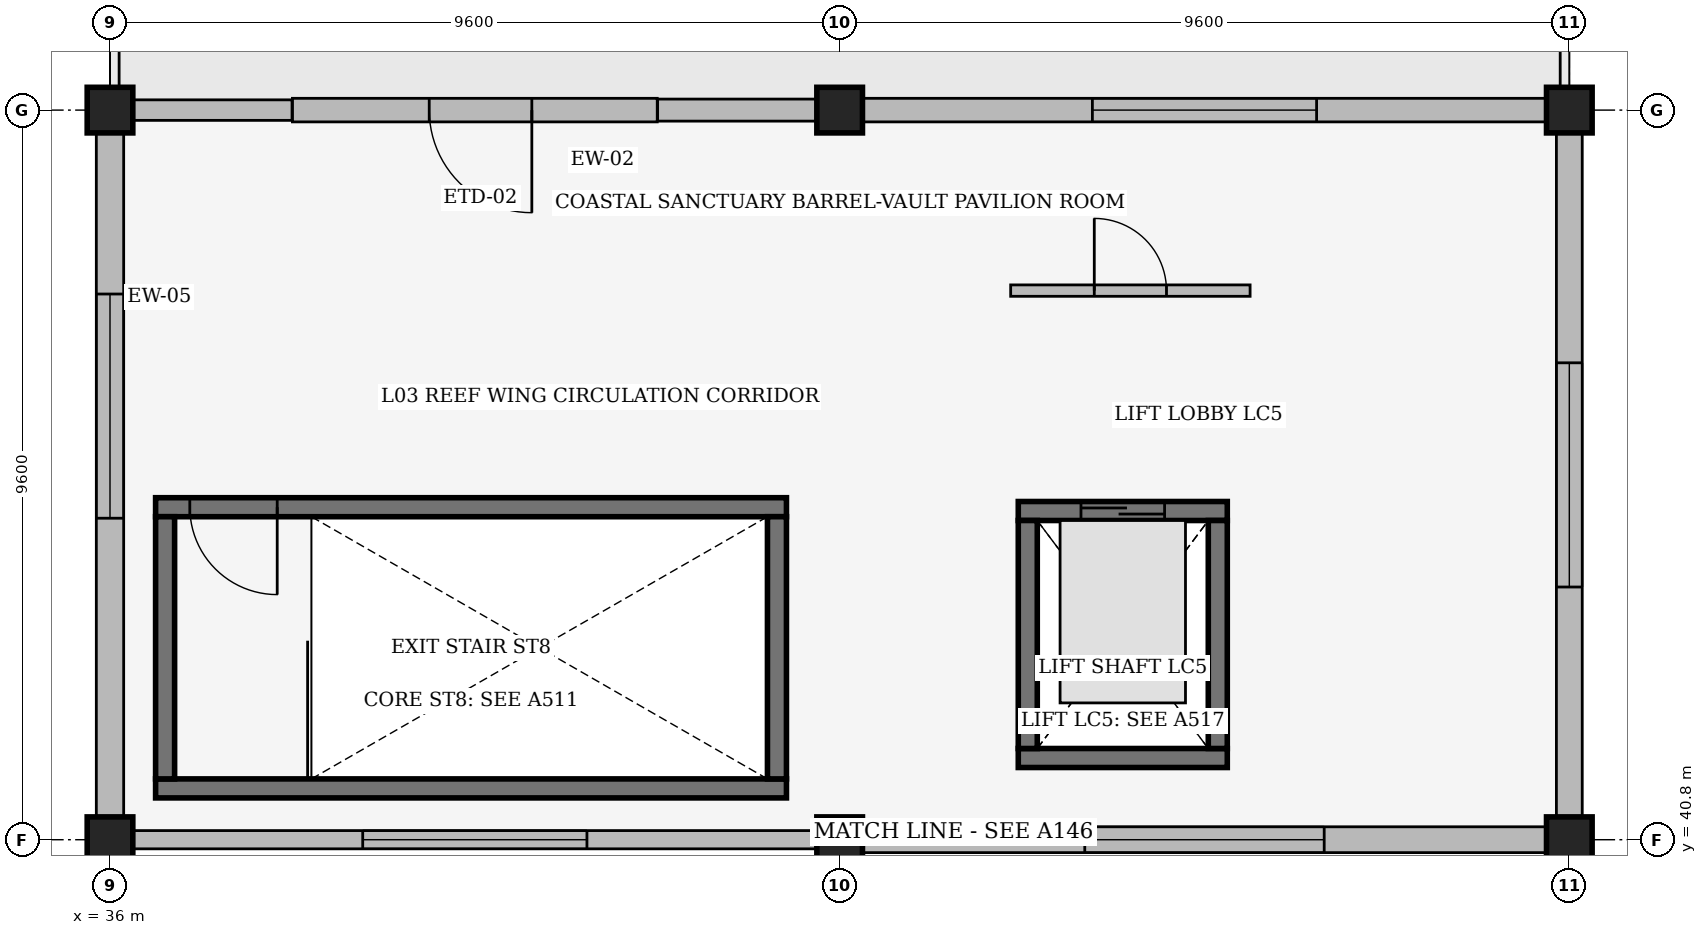
"""IFC4 building model, lengths in metres.
Left out: names, types, materials, properties, quantities, classifications, styles, units other than length and angle.
Written with IfcOpenShell. Run it as: python <this file> out.ifc"""

import sys

from ifc_helpers import new_model, si_unit, direction, frame, frame_2d, origin, origin_2d, place, context, subcontext, project, spatial, rectangle, extrude, element, fill, save


model = new_model("IFC4")
c1 = context("Model", 3, precision=1e-05, world=origin(), true_north=direction((0.0, 1.0)))
c2 = subcontext(c1, "Body", "Model", "MODEL_VIEW")
j1 = project(units=[si_unit("LENGTHUNIT", "METRE"), si_unit("PLANEANGLEUNIT", "RADIAN")], contexts=[c1])
p1 = place(None, origin())
s1 = spatial("IfcSite", under=j1, at=p1, CompositionType="ELEMENT")
p2 = place(p1, origin())
s2 = spatial("IfcBuilding", under=s1, at=p2, CompositionType="ELEMENT")
p3 = place(p2, frame((0.0, 0.0, 15.3)))
s3 = spatial("IfcBuildingStorey", under=s2, at=p3, CompositionType="ELEMENT", Elevation=15.3)
for number, where, z_axis, x_axis in (
    (1, (36.0, 40.8, 0.0), (0.0, 0.0, 1.0), (1.0, 0.0, 0.0)),
    (2, (36.0, 50.4, 0.0), (0.0, 0.0, 1.0), (1.0, 0.0, 0.0)),
    (3, (45.6, 40.8, 0.0), (0.0, 0.0, 1.0), (1.0, 0.0, 0.0)),
    (4, (45.6, 50.4, 0.0), (0.0, 0.0, 1.0), (1.0, 0.0, 0.0)),
    (5, (55.2, 40.8, 0.0), (0.0, 0.0, 1.0), (1.0, 0.0, 0.0)),
    (6, (55.2, 50.4, 0.0), (0.0, 0.0, 1.0), (1.0, 0.0, 0.0)),
):
    element("IfcColumn", number, at=place(p3, frame(where, z_axis=z_axis, x_axis=x_axis)), inside=s3, PredefinedType="COLUMN", context=c2, shape_type="SweptSolid", body=[
        extrude(rectangle(XDim=0.6, YDim=0.6, at=origin_2d()), origin(), (0.0, 0.0, 1.0), 4.5),
    ])
p4 = place(p3, frame((43.2, 50.4, 0.0), z_axis=(0.0, 0.0, 1.0), x_axis=(-1.0, 0.0, 0.0)))
e7 = element("IfcWall", 7, at=p4, inside=s3, PredefinedType="SOLIDWALL", context=c2, shape_type="SweptSolid", body=[
    extrude(rectangle(XDim=4.8, YDim=0.31, at=frame_2d((2.4, 0.0))), origin(), (0.0, 0.0, 1.0), 4.16),
])
p5 = place(p4, frame((3.0, 0.0, 0.0), z_axis=(0.0, 0.0, 1.0), x_axis=(-1.0, 0.0, 0.0)))
e8 = element("IfcOpeningElement", 8, at=p5, cuts=e7, PredefinedType="OPENING", context=c2, shape_type="SweptSolid", body=[
    extrude(rectangle(XDim=1.35, YDim=2.2, at=frame_2d((0.675, 1.1))), frame((0.0, 0.165, 0.0), z_axis=(0.0, -1.0, 0.0), x_axis=(1.0, 0.0, 0.0)), (0.0, 0.0, 1.0), 0.33),
])
p6 = place(p3, frame((55.2, 41.108, 0.0), z_axis=(0.0, 0.0, 1.0), x_axis=(0.0, 1.0, 0.0)))
e9 = element("IfcWall", 9, at=p6, inside=s3, PredefinedType="SOLIDWALL", context=c2, shape_type="SweptSolid", body=[
    extrude(rectangle(XDim=8.984, YDim=0.34, at=frame_2d((4.492, 0.0))), origin(), (0.0, 0.0, 1.0), 4.108),
])
p7 = place(p6, frame((3.017, 0.0, 0.95)))
e10 = element("IfcOpeningElement", 10, at=p7, cuts=e9, PredefinedType="OPENING", context=c2, shape_type="SweptSolid", body=[
    extrude(rectangle(XDim=2.95, YDim=1.2, at=frame_2d((1.475, 0.6))), frame((0.0, 0.18, 0.0), z_axis=(0.0, -1.0, 0.0), x_axis=(1.0, 0.0, 0.0)), (0.0, 0.0, 1.0), 0.36),
])
p8 = place(p3, frame((54.892, 50.4, 0.0), z_axis=(0.0, 0.0, 1.0), x_axis=(-1.0, 0.0, 0.0)))
e11 = element("IfcWall", 11, at=p8, inside=s3, PredefinedType="SOLIDWALL", context=c2, shape_type="SweptSolid", body=[
    extrude(rectangle(XDim=8.984, YDim=0.31, at=frame_2d((4.492, 0.0))), origin(), (0.0, 0.0, 1.0), 4.108),
])
p9 = place(p8, frame((3.017, 0.0, 0.95)))
e12 = element("IfcOpeningElement", 12, at=p9, cuts=e11, PredefinedType="OPENING", context=c2, shape_type="SweptSolid", body=[
    extrude(rectangle(XDim=2.95, YDim=1.5, at=frame_2d((1.475, 0.75))), frame((0.0, 0.165, 0.0), z_axis=(0.0, -1.0, 0.0), x_axis=(1.0, 0.0, 0.0)), (0.0, 0.0, 1.0), 0.33),
])
p10 = place(p3, frame((45.292, 50.4, 0.0), z_axis=(0.0, 0.0, 1.0), x_axis=(-1.0, 0.0, 0.0)))
e13 = element("IfcWall", 13, at=p10, inside=s3, PredefinedType="SOLIDWALL", context=c2, shape_type="SweptSolid", body=[
    extrude(rectangle(XDim=2.087, YDim=0.29, at=frame_2d((1.043, 0.0))), origin(), (0.0, 0.0, 1.0), 4.108),
])
p11 = place(p3, frame((38.395, 50.4, 0.0), z_axis=(0.0, 0.0, 1.0), x_axis=(-1.0, 0.0, 0.0)))
e14 = element("IfcWall", 14, at=p11, inside=s3, PredefinedType="SOLIDWALL", context=c2, shape_type="SweptSolid", body=[
    extrude(rectangle(XDim=2.087, YDim=0.27, at=frame_2d((1.043, 0.0))), origin(), (0.0, 0.0, 1.0), 4.108),
])
p12 = place(p3, frame((36.0, 50.092, 0.0), z_axis=(0.0, 0.0, 1.0), x_axis=(0.0, -1.0, 0.0)))
e15 = element("IfcWall", 15, at=p12, inside=s3, PredefinedType="SOLIDWALL", context=c2, shape_type="SweptSolid", body=[
    extrude(rectangle(XDim=8.984, YDim=0.36, at=frame_2d((4.492, 0.0))), origin(), (0.0, 0.0, 1.0), 4.108),
])
p13 = place(p12, frame((2.112, 0.0, 0.95)))
e16 = element("IfcOpeningElement", 16, at=p13, cuts=e15, PredefinedType="OPENING", context=c2, shape_type="SweptSolid", body=[
    extrude(rectangle(XDim=2.95, YDim=1.8, at=frame_2d((1.475, 0.9))), frame((0.0, 0.19, 0.0), z_axis=(0.0, -1.0, 0.0), x_axis=(1.0, 0.0, 0.0)), (0.0, 0.0, 1.0), 0.38),
])
p14 = place(p3, frame((36.308, 40.8, 0.0), z_axis=(0.0, 0.0, 1.0), x_axis=(1.0, 0.0, 0.0)))
e17 = element("IfcWall", 17, at=p14, inside=s3, PredefinedType="SOLIDWALL", context=c2, shape_type="SweptSolid", body=[
    extrude(rectangle(XDim=8.984, YDim=0.24, at=frame_2d((4.492, 0.0))), origin(), (0.0, 0.0, 1.0), 4.108),
])
p15 = place(p14, frame((3.017, 0.0, 0.95)))
e18 = element("IfcOpeningElement", 18, at=p15, cuts=e17, PredefinedType="OPENING", context=c2, shape_type="SweptSolid", body=[
    extrude(rectangle(XDim=2.95, YDim=2.1, at=frame_2d((1.475, 1.05))), frame((0.0, 0.13, 0.0), z_axis=(0.0, -1.0, 0.0), x_axis=(1.0, 0.0, 0.0)), (0.0, 0.0, 1.0), 0.26),
])
p16 = place(p3, frame((45.908, 40.8, 0.0), z_axis=(0.0, 0.0, 1.0), x_axis=(1.0, 0.0, 0.0)))
e19 = element("IfcWall", 19, at=p16, inside=s3, PredefinedType="SOLIDWALL", context=c2, shape_type="SweptSolid", body=[
    extrude(rectangle(XDim=8.984, YDim=0.34, at=frame_2d((4.492, 0.0))), origin(), (0.0, 0.0, 1.0), 4.108),
])
p17 = place(p16, frame((2.917, 0.0, 0.95)))
e20 = element("IfcOpeningElement", 20, at=p17, cuts=e19, PredefinedType="OPENING", context=c2, shape_type="SweptSolid", body=[
    extrude(rectangle(XDim=3.15, YDim=1.2, at=frame_2d((1.575, 0.6))), frame((0.0, 0.18, 0.0), z_axis=(0.0, -1.0, 0.0), x_axis=(1.0, 0.0, 0.0)), (0.0, 0.0, 1.0), 0.36),
])
p18 = place(p3, frame((36.6, 41.475, 0.0), z_axis=(0.0, 0.0, 1.0), x_axis=(1.0, 0.0, 0.0)))
e21 = element("IfcWall", 21, at=p18, inside=s3, PredefinedType="SHEAR", context=c2, shape_type="SweptSolid", body=[
    extrude(rectangle(XDim=8.3, YDim=0.25, at=frame_2d((4.15, 0.0))), origin(), (0.0, 0.0, 1.0), 4.5),
])
p19 = place(p3, frame((44.9, 45.175, 0.0), z_axis=(0.0, 0.0, 1.0), x_axis=(-1.0, 0.0, 0.0)))
e22 = element("IfcWall", 22, at=p19, inside=s3, PredefinedType="SHEAR", context=c2, shape_type="SweptSolid", body=[
    extrude(rectangle(XDim=8.3, YDim=0.25, at=frame_2d((4.15, 0.0))), origin(), (0.0, 0.0, 1.0), 4.5),
])
p20 = place(p19, frame((7.85, 0.0, 0.0), z_axis=(0.0, 0.0, 1.0), x_axis=(-1.0, 0.0, 0.0)))
e23 = element("IfcOpeningElement", 23, at=p20, cuts=e22, PredefinedType="OPENING", context=c2, shape_type="SweptSolid", body=[
    extrude(rectangle(XDim=1.15, YDim=2.2, at=frame_2d((0.575, 1.1))), frame((0.0, 0.135, 0.0), z_axis=(0.0, -1.0, 0.0), x_axis=(1.0, 0.0, 0.0)), (0.0, 0.0, 1.0), 0.27),
])
for number, where, z_axis, x_axis in (
    (24, (36.725, 45.05, 0.0), (0.0, 0.0, 1.0), (0.0, -1.0, 0.0)),
    (25, (44.775, 41.6, 0.0), (0.0, 0.0, 1.0), (0.0, 1.0, 0.0)),
):
    element("IfcWall", number, at=place(p3, frame(where, z_axis=z_axis, x_axis=x_axis)), inside=s3, PredefinedType="SHEAR", context=c2, shape_type="SweptSolid", body=[
        extrude(rectangle(XDim=3.45, YDim=0.25, at=frame_2d((1.725, 0.0))), origin(), (0.0, 0.0, 1.0), 4.5),
    ])
p21 = place(p3, frame((47.95, 41.875, 0.0), z_axis=(0.0, 0.0, 1.0), x_axis=(1.0, 0.0, 0.0)))
e26 = element("IfcWall", 26, at=p21, inside=s3, PredefinedType="SHEAR", context=c2, shape_type="SweptSolid", body=[
    extrude(rectangle(XDim=2.75, YDim=0.25, at=frame_2d((1.375, 0.0))), origin(), (0.0, 0.0, 1.0), 4.5),
])
p22 = place(p3, frame((47.95, 45.125, 0.0), z_axis=(0.0, 0.0, 1.0), x_axis=(1.0, 0.0, 0.0)))
e27 = element("IfcWall", 27, at=p22, inside=s3, PredefinedType="SHEAR", context=c2, shape_type="SweptSolid", body=[
    extrude(rectangle(XDim=2.75, YDim=0.25, at=frame_2d((1.375, 0.0))), origin(), (0.0, 0.0, 1.0), 4.5),
])
p23 = place(p22, frame((0.825, 0.0, 0.0)))
e28 = element("IfcOpeningElement", 28, at=p23, cuts=e27, PredefinedType="OPENING", context=c2, shape_type="SweptSolid", body=[
    extrude(rectangle(XDim=1.1, YDim=2.2, at=frame_2d((0.55, 1.1))), frame((0.0, 0.135, 0.0), z_axis=(0.0, -1.0, 0.0), x_axis=(1.0, 0.0, 0.0)), (0.0, 0.0, 1.0), 0.27),
])
for number, where, z_axis, x_axis in (
    (29, (48.075, 42.0, 0.0), (0.0, 0.0, 1.0), (0.0, 1.0, 0.0)),
    (30, (50.575, 42.0, 0.0), (0.0, 0.0, 1.0), (0.0, 1.0, 0.0)),
):
    element("IfcWall", number, at=place(p3, frame(where, z_axis=z_axis, x_axis=x_axis)), inside=s3, PredefinedType="SHEAR", context=c2, shape_type="SweptSolid", body=[
        extrude(rectangle(XDim=3.0, YDim=0.25, at=frame_2d((1.5, 0.0))), origin(), (0.0, 0.0, 1.0), 4.5),
    ])
p24 = place(p3, frame((47.85, 48.025, 0.0), z_axis=(0.0, 0.0, 1.0), x_axis=(1.0, 0.0, 0.0)))
e31 = element("IfcWall", 31, at=p24, inside=s3, PredefinedType="PARTITIONING", context=c2, shape_type="SweptSolid", body=[
    extrude(rectangle(XDim=3.15, YDim=0.15, at=frame_2d((1.575, 0.0))), origin(), (0.0, 0.0, 1.0), 4.14),
])
p25 = place(p24, frame((1.1, 0.0, 0.0)))
e32 = element("IfcOpeningElement", 32, at=p25, cuts=e31, PredefinedType="OPENING", context=c2, shape_type="SweptSolid", body=[
    extrude(rectangle(XDim=0.95, YDim=2.15, at=frame_2d((0.475, 1.075))), frame((0.0, 0.085, 0.0), z_axis=(0.0, -1.0, 0.0), x_axis=(1.0, 0.0, 0.0)), (0.0, 0.0, 1.0), 0.17),
])
p26 = place(p5, origin())
e33 = element("IfcDoor", 33, at=p26, inside=s3, OperationType="SINGLE_SWING_RIGHT", PredefinedType="DOOR", context=c2, shape_type="SweptSolid", body=[
    extrude(rectangle(XDim=1.35, YDim=2.2, at=frame_2d((0.675, 1.1))), frame((0.0, 0.025, 0.0), z_axis=(0.0, -1.0, 0.0), x_axis=(1.0, 0.0, 0.0)), (0.0, 0.0, 1.0), 0.05),
])
fill(e8, e33)
p27 = place(p7, origin())
e34 = element("IfcWindow", 34, at=p27, inside=s3, PartitioningType="SINGLE_PANEL", PredefinedType="WINDOW", context=c2, shape_type="SweptSolid", body=[
    extrude(rectangle(XDim=2.95, YDim=1.2, at=frame_2d((1.475, 0.6))), frame((0.0, 0.03, 0.0), z_axis=(0.0, -1.0, 0.0), x_axis=(1.0, 0.0, 0.0)), (0.0, 0.0, 1.0), 0.06),
])
fill(e10, e34)
p28 = place(p9, origin())
e35 = element("IfcWindow", 35, at=p28, inside=s3, PartitioningType="SINGLE_PANEL", PredefinedType="WINDOW", context=c2, shape_type="SweptSolid", body=[
    extrude(rectangle(XDim=2.95, YDim=1.5, at=frame_2d((1.475, 0.75))), frame((0.0, 0.03, 0.0), z_axis=(0.0, -1.0, 0.0), x_axis=(1.0, 0.0, 0.0)), (0.0, 0.0, 1.0), 0.06),
])
fill(e12, e35)
p29 = place(p13, origin())
e36 = element("IfcWindow", 36, at=p29, inside=s3, PartitioningType="SINGLE_PANEL", PredefinedType="WINDOW", context=c2, shape_type="SweptSolid", body=[
    extrude(rectangle(XDim=2.95, YDim=1.8, at=frame_2d((1.475, 0.9))), frame((0.0, 0.03, 0.0), z_axis=(0.0, -1.0, 0.0), x_axis=(1.0, 0.0, 0.0)), (0.0, 0.0, 1.0), 0.06),
])
fill(e16, e36)
p30 = place(p15, origin())
e37 = element("IfcWindow", 37, at=p30, inside=s3, PartitioningType="SINGLE_PANEL", PredefinedType="WINDOW", context=c2, shape_type="SweptSolid", body=[
    extrude(rectangle(XDim=2.95, YDim=2.1, at=frame_2d((1.475, 1.05))), frame((0.0, 0.03, 0.0), z_axis=(0.0, -1.0, 0.0), x_axis=(1.0, 0.0, 0.0)), (0.0, 0.0, 1.0), 0.06),
])
fill(e18, e37)
p31 = place(p17, origin())
e38 = element("IfcWindow", 38, at=p31, inside=s3, PartitioningType="SINGLE_PANEL", PredefinedType="WINDOW", context=c2, shape_type="SweptSolid", body=[
    extrude(rectangle(XDim=3.15, YDim=1.2, at=frame_2d((1.575, 0.6))), frame((0.0, 0.03, 0.0), z_axis=(0.0, -1.0, 0.0), x_axis=(1.0, 0.0, 0.0)), (0.0, 0.0, 1.0), 0.06),
])
fill(e20, e38)
p32 = place(p20, origin())
e39 = element("IfcDoor", 39, at=p32, inside=s3, OperationType="SINGLE_SWING_RIGHT", PredefinedType="DOOR", context=c2, shape_type="SweptSolid", body=[
    extrude(rectangle(XDim=1.15, YDim=2.2, at=frame_2d((0.575, 1.1))), frame((0.0, 0.025, 0.0), z_axis=(0.0, -1.0, 0.0), x_axis=(1.0, 0.0, 0.0)), (0.0, 0.0, 1.0), 0.05),
])
fill(e23, e39)
p33 = place(p23, origin())
e40 = element("IfcDoor", 40, at=p33, inside=s3, OperationType="DOUBLE_DOOR_SLIDING", PredefinedType="DOOR", context=c2, shape_type="SweptSolid", body=[
    extrude(rectangle(XDim=1.1, YDim=2.2, at=frame_2d((0.55, 1.1))), frame((0.0, 0.025, 0.0), z_axis=(0.0, -1.0, 0.0), x_axis=(1.0, 0.0, 0.0)), (0.0, 0.0, 1.0), 0.05),
])
fill(e28, e40)
p34 = place(p25, origin())
e41 = element("IfcDoor", 41, at=p34, inside=s3, OperationType="SINGLE_SWING_LEFT", PredefinedType="DOOR", context=c2, shape_type="SweptSolid", body=[
    extrude(rectangle(XDim=0.95, YDim=2.15, at=frame_2d((0.475, 1.075))), frame((0.0, 0.025, 0.0), z_axis=(0.0, -1.0, 0.0), x_axis=(1.0, 0.0, 0.0)), (0.0, 0.0, 1.0), 0.05),
])
fill(e32, e41)
save(model, sys.argv[1])
